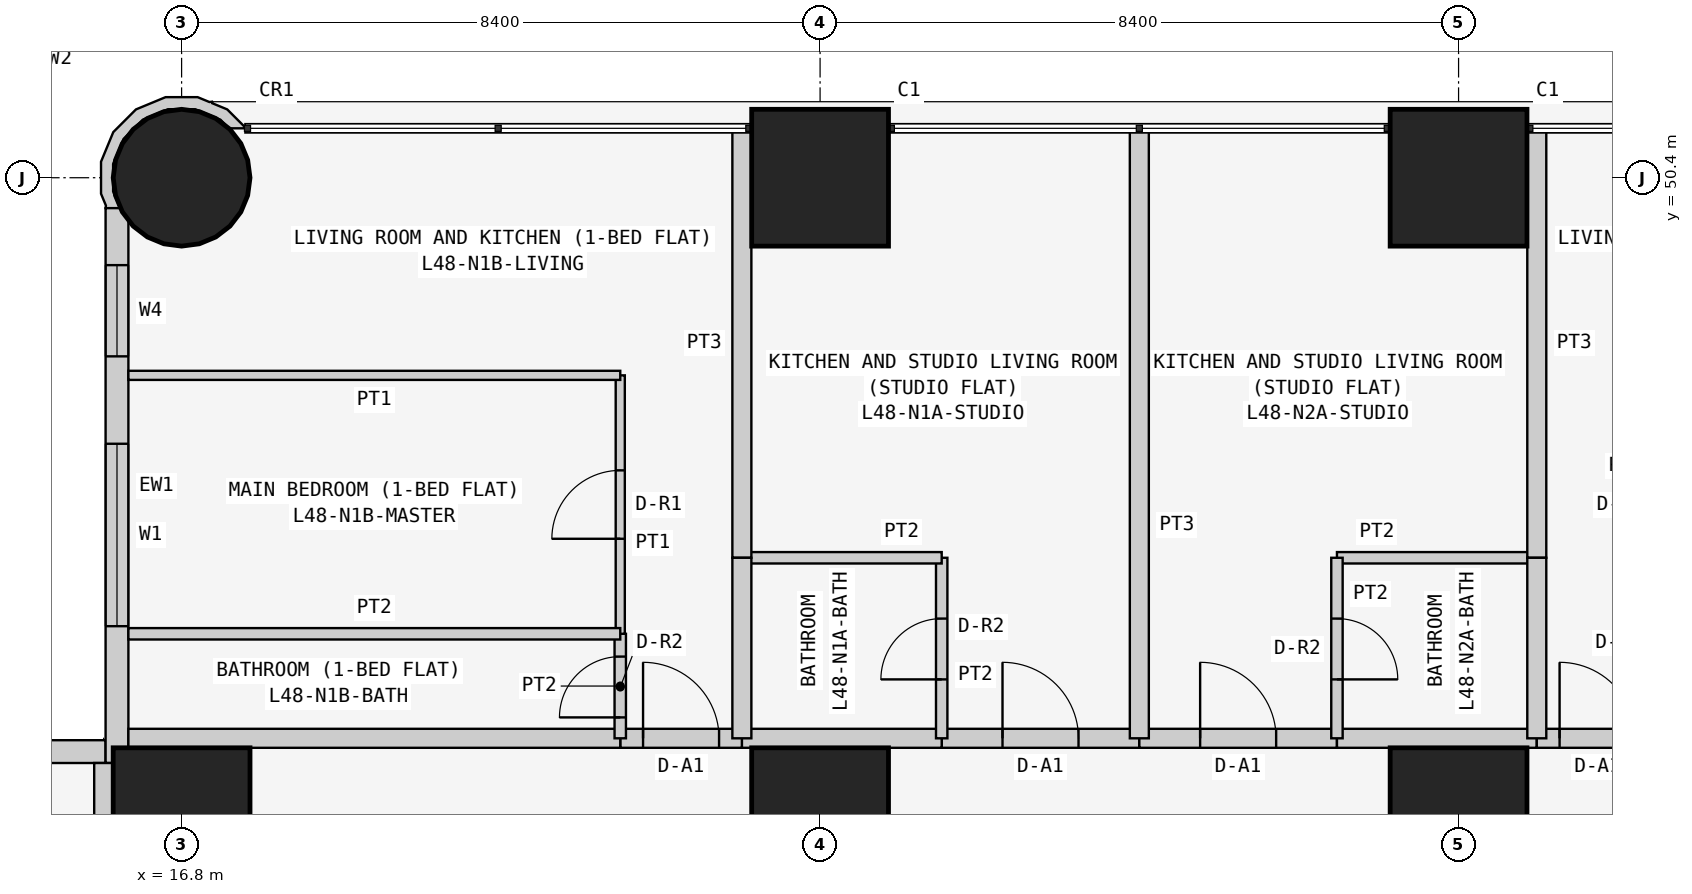
"""IFC4 building model, lengths in metres.
Left out: names, types, materials, properties, quantities, classifications, styles, units other than length and angle.
Written with IfcOpenShell. Run it as: python <this file> out.ifc"""

import sys

from ifc_helpers import new_model, si_unit, direction, frame, frame_2d, origin, origin_2d, place, context, subcontext, project, spatial, polyline, rectangle, circle, outline, extrude, element, fill, save


model = new_model("IFC4")
c1 = context("Model", 3, precision=1e-05, world=origin(), true_north=direction((0.0, 1.0)))
c2 = subcontext(c1, "Body", "Model", "MODEL_VIEW")
j1 = project(units=[si_unit("LENGTHUNIT", "METRE"), si_unit("PLANEANGLEUNIT", "RADIAN")], contexts=[c1])
p1 = place(None, origin())
s1 = spatial("IfcSite", under=j1, at=p1, CompositionType="ELEMENT")
p2 = place(p1, origin())
s2 = spatial("IfcBuilding", under=s1, at=p2, CompositionType="ELEMENT")
p3 = place(p2, frame((0.0, 0.0, 186.9)))
s3 = spatial("IfcBuildingStorey", under=s2, at=p3, CompositionType="ELEMENT", Elevation=186.9)
p4 = place(p3, frame((16.8, 42.0, 0.0), z_axis=(0.0, 0.0, 1.0), x_axis=(1.0, 0.0, 0.0)))
e1 = element("IfcColumn", 1, at=p4, inside=s3, PredefinedType="COLUMN", context=c2, shape_type="SweptSolid", body=[
    extrude(rectangle(XDim=1.8, YDim=1.8, at=origin_2d()), origin(), (0.0, 0.0, 1.0), 3.6),
])
p5 = place(p3, frame((16.8, 50.4, 0.0), z_axis=(0.0, 0.0, 1.0), x_axis=(1.0, 0.0, 0.0)))
e2 = element("IfcColumn", 2, at=p5, inside=s3, PredefinedType="COLUMN", context=c2, shape_type="SweptSolid", body=[
    extrude(circle(Radius=0.9, at=origin_2d()), origin(), (0.0, 0.0, 1.0), 3.6),
])
for number, where, z_axis, x_axis in (
    (3, (25.2, 42.0, 0.0), (0.0, 0.0, 1.0), (1.0, 0.0, 0.0)),
    (4, (25.2, 50.4, 0.0), (0.0, 0.0, 1.0), (1.0, 0.0, 0.0)),
    (5, (33.6, 42.0, 0.0), (0.0, 0.0, 1.0), (1.0, 0.0, 0.0)),
    (6, (33.6, 50.4, 0.0), (0.0, 0.0, 1.0), (1.0, 0.0, 0.0)),
):
    element("IfcColumn", number, at=place(p3, frame(where, z_axis=z_axis, x_axis=x_axis)), inside=s3, PredefinedType="COLUMN", context=c2, shape_type="SweptSolid", body=[
        extrude(rectangle(XDim=1.8, YDim=1.8, at=origin_2d()), origin(), (0.0, 0.0, 1.0), 3.6),
    ])
p6 = place(p3, frame((15.8, 42.85, 0.0), z_axis=(0.0, 0.0, 1.0), x_axis=(-1.0, 0.0, 0.0)))
e7 = element("IfcWall", 7, at=p6, inside=s3, PredefinedType="SOLIDWALL", context=c2, shape_type="SweptSolid", body=[
    extrude(rectangle(XDim=15.4, YDim=0.3, at=frame_2d((7.7, 0.0))), origin(), (0.0, 0.0, 1.0), 3.45),
])
p7 = place(p6, frame((1.2, 0.0, 0.9)))
e8 = element("IfcOpeningElement", 8, at=p7, cuts=e7, PredefinedType="OPENING", context=c2, shape_type="SweptSolid", body=[
    extrude(rectangle(XDim=1.8, YDim=1.5, at=frame_2d((0.9, 0.75))), frame((0.0, 0.16, 0.0), z_axis=(0.0, -1.0, 0.0), x_axis=(1.0, 0.0, 0.0)), (0.0, 0.0, 1.0), 0.32),
])
p8 = place(p6, frame((4.95, 0.0, 1.5)))
e9 = element("IfcOpeningElement", 9, at=p8, cuts=e7, PredefinedType="OPENING", context=c2, shape_type="SweptSolid", body=[
    extrude(rectangle(XDim=0.9, YDim=0.7, at=frame_2d((0.45, 0.35))), frame((0.0, 0.16, 0.0), z_axis=(0.0, -1.0, 0.0), x_axis=(1.0, 0.0, 0.0)), (0.0, 0.0, 1.0), 0.32),
])
p9 = place(p6, frame((8.5, 0.0, 0.9)))
e10 = element("IfcOpeningElement", 10, at=p9, cuts=e7, PredefinedType="OPENING", context=c2, shape_type="SweptSolid", body=[
    extrude(rectangle(XDim=1.8, YDim=1.5, at=frame_2d((0.9, 0.75))), frame((0.0, 0.16, 0.0), z_axis=(0.0, -1.0, 0.0), x_axis=(1.0, 0.0, 0.0)), (0.0, 0.0, 1.0), 0.32),
])
p10 = place(p6, frame((12.5, 0.0, 0.0)))
e11 = element("IfcOpeningElement", 11, at=p10, cuts=e7, PredefinedType="OPENING", context=c2, shape_type="SweptSolid", body=[
    extrude(rectangle(XDim=0.9, YDim=2.4, at=frame_2d((0.45, 1.2))), frame((0.0, 0.16, 0.0), z_axis=(0.0, -1.0, 0.0), x_axis=(1.0, 0.0, 0.0)), (0.0, 0.0, 1.0), 0.32),
])
p11 = place(p6, frame((13.5, 0.0, 0.9)))
e12 = element("IfcOpeningElement", 12, at=p11, cuts=e7, PredefinedType="OPENING", context=c2, shape_type="SweptSolid", body=[
    extrude(rectangle(XDim=1.2, YDim=1.5, at=frame_2d((0.6, 0.75))), frame((0.0, 0.16, 0.0), z_axis=(0.0, -1.0, 0.0), x_axis=(1.0, 0.0, 0.0)), (0.0, 0.0, 1.0), 0.32),
])
p12 = place(p3, frame((15.95, 50.0, 0.0), z_axis=(0.0, 0.0, 1.0), x_axis=(0.0, -1.0, 0.0)))
e13 = element("IfcWall", 13, at=p12, inside=s3, PredefinedType="SOLIDWALL", context=c2, shape_type="SweptSolid", body=[
    extrude(rectangle(XDim=7.3, YDim=0.3, at=frame_2d((3.65, 0.0))), origin(), (0.0, 0.0, 1.0), 3.45),
])
p13 = place(p12, frame((3.1, 0.0, 0.9)))
e14 = element("IfcOpeningElement", 14, at=p13, cuts=e13, PredefinedType="OPENING", context=c2, shape_type="SweptSolid", body=[
    extrude(rectangle(XDim=2.4, YDim=1.5, at=frame_2d((1.2, 0.75))), frame((0.0, 0.16, 0.0), z_axis=(0.0, -1.0, 0.0), x_axis=(1.0, 0.0, 0.0)), (0.0, 0.0, 1.0), 0.32),
])
p14 = place(p12, frame((0.75, 0.0, 0.9)))
e15 = element("IfcOpeningElement", 15, at=p14, cuts=e13, PredefinedType="OPENING", context=c2, shape_type="SweptSolid", body=[
    extrude(rectangle(XDim=1.2, YDim=1.5, at=frame_2d((0.6, 0.75))), frame((0.0, 0.16, 0.0), z_axis=(0.0, -1.0, 0.0), x_axis=(1.0, 0.0, 0.0)), (0.0, 0.0, 1.0), 0.32),
])
p15 = place(p3, frame((17.567, 51.011, 0.0), z_axis=(0.0, 0.0, 1.0), x_axis=(-0.377204953059, 0.926129809145, 0.0)))
e16 = element("IfcWall", 16, at=p15, inside=s3, PredefinedType="SOLIDWALL", context=c2, shape_type="SweptSolid", body=[
    extrude(outline(polyline([(-0.27, 2.017), (-0.37, 1.841), (-0.102, 1.842), (0.23, 1.707), (0.485, 1.455), (0.624, 1.125), (0.626, 0.766), (0.491, 0.434), (0.239, 0.18), (0.09, 0.117), (0.011, -0.078), (0.025, -0.083), (0.329, 0.045), (0.48, 0.197), (0.499, 0.193), (0.507, 0.225), (0.626, 0.345), (0.785, 0.736), (0.782, 1.157), (0.619, 1.546), (0.319, 1.842), (-0.072, 2.001), (-0.24, 2.0), (-0.27, 2.017)])), origin(), (0.0, 0.0, 1.0), 3.45),
])
p16 = place(p3, frame((26.8, 43.025, 0.0), z_axis=(0.0, 0.0, 1.0), x_axis=(1.0, 0.0, 0.0)))
e17 = element("IfcWall", 17, at=p16, inside=s3, PredefinedType="PARTITIONING", context=c2, shape_type="SweptSolid", body=[
    extrude(rectangle(XDim=2.6, YDim=0.25, at=frame_2d((1.3, 0.0))), origin(), (0.0, 0.0, 1.0), 3.45),
])
p17 = place(p16, frame((0.8, 0.0, 0.0)))
e18 = element("IfcOpeningElement", 18, at=p17, cuts=e17, PredefinedType="OPENING", context=c2, shape_type="SweptSolid", body=[
    extrude(rectangle(XDim=1.0, YDim=2.1, at=frame_2d((0.5, 1.05))), frame((0.0, 0.135, 0.0), z_axis=(0.0, -1.0, 0.0), x_axis=(1.0, 0.0, 0.0)), (0.0, 0.0, 1.0), 0.27),
])
p18 = place(p3, frame((24.171, 43.025, 0.0), z_axis=(0.0, 0.0, 1.0), x_axis=(1.0, 0.0, 0.0)))
e19 = element("IfcWall", 19, at=p18, inside=s3, PredefinedType="PARTITIONING", context=c2, shape_type="SweptSolid", body=[
    extrude(rectangle(XDim=2.629, YDim=0.25, at=frame_2d((1.314, 0.0))), origin(), (0.0, 0.0, 1.0), 3.45),
])
p19 = place(p3, frame((22.571, 43.025, 0.0), z_axis=(0.0, 0.0, 1.0), x_axis=(1.0, 0.0, 0.0)))
e20 = element("IfcWall", 20, at=p19, inside=s3, PredefinedType="PARTITIONING", context=c2, shape_type="SweptSolid", body=[
    extrude(rectangle(XDim=1.6, YDim=0.25, at=frame_2d((0.8, 0.0))), origin(), (0.0, 0.0, 1.0), 3.45),
])
p20 = place(p19, frame((0.3, 0.0, 0.0)))
e21 = element("IfcOpeningElement", 21, at=p20, cuts=e20, PredefinedType="OPENING", context=c2, shape_type="SweptSolid", body=[
    extrude(rectangle(XDim=1.0, YDim=2.1, at=frame_2d((0.5, 1.05))), frame((0.0, 0.135, 0.0), z_axis=(0.0, -1.0, 0.0), x_axis=(1.0, 0.0, 0.0)), (0.0, 0.0, 1.0), 0.27),
])
p21 = place(p3, frame((16.1, 43.025, 0.0), z_axis=(0.0, 0.0, 1.0), x_axis=(1.0, 0.0, 0.0)))
e22 = element("IfcWall", 22, at=p21, inside=s3, PredefinedType="PARTITIONING", context=c2, shape_type="SweptSolid", body=[
    extrude(rectangle(XDim=6.471, YDim=0.25, at=frame_2d((3.235, 0.0))), origin(), (0.0, 0.0, 1.0), 3.45),
])
p22 = place(p3, frame((29.4, 43.025, 0.0), z_axis=(0.0, 0.0, 1.0), x_axis=(1.0, 0.0, 0.0)))
e23 = element("IfcWall", 23, at=p22, inside=s3, PredefinedType="PARTITIONING", context=c2, shape_type="SweptSolid", body=[
    extrude(rectangle(XDim=2.6, YDim=0.25, at=frame_2d((1.3, 0.0))), origin(), (0.0, 0.0, 1.0), 3.45),
])
p23 = place(p22, frame((0.8, 0.0, 0.0)))
e24 = element("IfcOpeningElement", 24, at=p23, cuts=e23, PredefinedType="OPENING", context=c2, shape_type="SweptSolid", body=[
    extrude(rectangle(XDim=1.0, YDim=2.1, at=frame_2d((0.5, 1.05))), frame((0.0, 0.135, 0.0), z_axis=(0.0, -1.0, 0.0), x_axis=(1.0, 0.0, 0.0)), (0.0, 0.0, 1.0), 0.27),
])
p24 = place(p3, frame((32.0, 43.025, 0.0), z_axis=(0.0, 0.0, 1.0), x_axis=(1.0, 0.0, 0.0)))
e25 = element("IfcWall", 25, at=p24, inside=s3, PredefinedType="PARTITIONING", context=c2, shape_type="SweptSolid", body=[
    extrude(rectangle(XDim=2.629, YDim=0.25, at=frame_2d((1.314, 0.0))), origin(), (0.0, 0.0, 1.0), 3.45),
])
p25 = place(p3, frame((34.629, 43.025, 0.0), z_axis=(0.0, 0.0, 1.0), x_axis=(1.0, 0.0, 0.0)))
e26 = element("IfcWall", 26, at=p25, inside=s3, PredefinedType="PARTITIONING", context=c2, shape_type="SweptSolid", body=[
    extrude(rectangle(XDim=1.6, YDim=0.25, at=frame_2d((0.8, 0.0))), origin(), (0.0, 0.0, 1.0), 3.45),
])
p26 = place(p25, frame((0.3, 0.0, 0.0)))
e27 = element("IfcOpeningElement", 27, at=p26, cuts=e26, PredefinedType="OPENING", context=c2, shape_type="SweptSolid", body=[
    extrude(rectangle(XDim=1.0, YDim=2.1, at=frame_2d((0.5, 1.05))), frame((0.0, 0.135, 0.0), z_axis=(0.0, -1.0, 0.0), x_axis=(1.0, 0.0, 0.0)), (0.0, 0.0, 1.0), 0.27),
])
p27 = place(p3, frame((15.775, 35.829, 0.0), z_axis=(0.0, 0.0, 1.0), x_axis=(0.0, 1.0, 0.0)))
e28 = element("IfcWall", 28, at=p27, inside=s3, PredefinedType="PARTITIONING", context=c2, shape_type="SweptSolid", body=[
    extrude(rectangle(XDim=6.871, YDim=0.25, at=frame_2d((3.436, 0.0))), origin(), (0.0, 0.0, 1.0), 3.45),
])
p28 = place(p3, frame((26.8, 43.025, 0.0), z_axis=(0.0, 0.0, 1.0), x_axis=(0.0, 1.0, 0.0)))
e29 = element("IfcWall", 29, at=p28, inside=s3, PredefinedType="PARTITIONING", context=c2, shape_type="SweptSolid", body=[
    extrude(rectangle(XDim=2.375, YDim=0.15, at=frame_2d((1.188, 0.0))), origin(), (0.0, 0.0, 1.0), 3.45),
])
p29 = place(p28, frame((0.775, 0.0, 0.0)))
e30 = element("IfcOpeningElement", 30, at=p29, cuts=e29, PredefinedType="OPENING", context=c2, shape_type="SweptSolid", body=[
    extrude(rectangle(XDim=0.8, YDim=2.1, at=frame_2d((0.4, 1.05))), frame((0.0, 0.085, 0.0), z_axis=(0.0, -1.0, 0.0), x_axis=(1.0, 0.0, 0.0)), (0.0, 0.0, 1.0), 0.17),
])
p30 = place(p3, frame((26.8, 45.4, 0.0), z_axis=(0.0, 0.0, 1.0), x_axis=(-1.0, 0.0, 0.0)))
e31 = element("IfcWall", 31, at=p30, inside=s3, PredefinedType="PARTITIONING", context=c2, shape_type="SweptSolid", body=[
    extrude(rectangle(XDim=2.629, YDim=0.15, at=frame_2d((1.314, 0.0))), origin(), (0.0, 0.0, 1.0), 3.45),
])
p31 = place(p3, frame((24.171, 45.4, 0.0), z_axis=(0.0, 0.0, 1.0), x_axis=(0.0, 1.0, 0.0)))
e32 = element("IfcWall", 32, at=p31, inside=s3, PredefinedType="PARTITIONING", context=c2, shape_type="SweptSolid", body=[
    extrude(rectangle(XDim=5.65, YDim=0.25, at=frame_2d((2.825, 0.0))), origin(), (0.0, 0.0, 1.0), 3.45),
])
p32 = place(p3, frame((29.4, 51.05, 0.0), z_axis=(0.0, 0.0, 1.0), x_axis=(0.0, -1.0, 0.0)))
e33 = element("IfcWall", 33, at=p32, inside=s3, PredefinedType="PARTITIONING", context=c2, shape_type="SweptSolid", body=[
    extrude(rectangle(XDim=8.025, YDim=0.25, at=frame_2d((4.013, 0.0))), origin(), (0.0, 0.0, 1.0), 2.848),
])
p33 = place(p3, frame((24.171, 45.4, 0.0), z_axis=(0.0, 0.0, 1.0), x_axis=(0.0, -1.0, 0.0)))
e34 = element("IfcWall", 34, at=p33, inside=s3, PredefinedType="PARTITIONING", context=c2, shape_type="SweptSolid", body=[
    extrude(rectangle(XDim=2.375, YDim=0.25, at=frame_2d((1.188, 0.0))), origin(), (0.0, 0.0, 1.0), 3.45),
])
p34 = place(p3, frame((22.571, 43.025, 0.0), z_axis=(0.0, 0.0, 1.0), x_axis=(0.0, 1.0, 0.0)))
e35 = element("IfcWall", 35, at=p34, inside=s3, PredefinedType="PARTITIONING", context=c2, shape_type="SweptSolid", body=[
    extrude(rectangle(XDim=1.375, YDim=0.15, at=frame_2d((0.688, 0.0))), origin(), (0.0, 0.0, 1.0), 3.45),
])
p35 = place(p34, frame((0.275, 0.0, 0.0)))
e36 = element("IfcOpeningElement", 36, at=p35, cuts=e35, PredefinedType="OPENING", context=c2, shape_type="SweptSolid", body=[
    extrude(rectangle(XDim=0.8, YDim=2.1, at=frame_2d((0.4, 1.05))), frame((0.0, 0.085, 0.0), z_axis=(0.0, -1.0, 0.0), x_axis=(1.0, 0.0, 0.0)), (0.0, 0.0, 1.0), 0.17),
])
p36 = place(p3, frame((22.571, 44.4, 0.0), z_axis=(0.0, 0.0, 1.0), x_axis=(0.0, 1.0, 0.0)))
e37 = element("IfcWall", 37, at=p36, inside=s3, PredefinedType="PARTITIONING", context=c2, shape_type="SweptSolid", body=[
    extrude(rectangle(XDim=3.4, YDim=0.12, at=frame_2d((1.7, 0.0))), origin(), (0.0, 0.0, 1.0), 3.45),
])
p37 = place(p36, frame((1.25, 0.0, 0.0)))
e38 = element("IfcOpeningElement", 38, at=p37, cuts=e37, PredefinedType="OPENING", context=c2, shape_type="SweptSolid", body=[
    extrude(rectangle(XDim=0.9, YDim=2.1, at=frame_2d((0.45, 1.05))), frame((0.0, 0.07, 0.0), z_axis=(0.0, -1.0, 0.0), x_axis=(1.0, 0.0, 0.0)), (0.0, 0.0, 1.0), 0.14),
])
p38 = place(p3, frame((22.571, 47.8, 0.0), z_axis=(0.0, 0.0, 1.0), x_axis=(-1.0, 0.0, 0.0)))
e39 = element("IfcWall", 39, at=p38, inside=s3, PredefinedType="PARTITIONING", context=c2, shape_type="SweptSolid", body=[
    extrude(rectangle(XDim=6.471, YDim=0.12, at=frame_2d((3.235, 0.0))), origin(), (0.0, 0.0, 1.0), 3.45),
])
p39 = place(p3, frame((22.571, 44.4, 0.0), z_axis=(0.0, 0.0, 1.0), x_axis=(-1.0, 0.0, 0.0)))
e40 = element("IfcWall", 40, at=p39, inside=s3, PredefinedType="PARTITIONING", context=c2, shape_type="SweptSolid", body=[
    extrude(rectangle(XDim=6.471, YDim=0.15, at=frame_2d((3.235, 0.0))), origin(), (0.0, 0.0, 1.0), 3.45),
])
p40 = place(p3, frame((34.629, 45.4, 0.0), z_axis=(0.0, 0.0, 1.0), x_axis=(-1.0, 0.0, 0.0)))
e41 = element("IfcWall", 41, at=p40, inside=s3, PredefinedType="PARTITIONING", context=c2, shape_type="SweptSolid", body=[
    extrude(rectangle(XDim=2.629, YDim=0.15, at=frame_2d((1.314, 0.0))), origin(), (0.0, 0.0, 1.0), 3.45),
])
p41 = place(p3, frame((32.0, 45.4, 0.0), z_axis=(0.0, 0.0, 1.0), x_axis=(0.0, -1.0, 0.0)))
e42 = element("IfcWall", 42, at=p41, inside=s3, PredefinedType="PARTITIONING", context=c2, shape_type="SweptSolid", body=[
    extrude(rectangle(XDim=2.375, YDim=0.15, at=frame_2d((1.188, 0.0))), origin(), (0.0, 0.0, 1.0), 3.45),
])
p42 = place(p41, frame((0.8, 0.0, 0.0)))
e43 = element("IfcOpeningElement", 43, at=p42, cuts=e42, PredefinedType="OPENING", context=c2, shape_type="SweptSolid", body=[
    extrude(rectangle(XDim=0.8, YDim=2.1, at=frame_2d((0.4, 1.05))), frame((0.0, 0.085, 0.0), z_axis=(0.0, -1.0, 0.0), x_axis=(1.0, 0.0, 0.0)), (0.0, 0.0, 1.0), 0.17),
])
p43 = place(p3, frame((34.629, 51.05, 0.0), z_axis=(0.0, 0.0, 1.0), x_axis=(0.0, -1.0, 0.0)))
e44 = element("IfcWall", 44, at=p43, inside=s3, PredefinedType="PARTITIONING", context=c2, shape_type="SweptSolid", body=[
    extrude(rectangle(XDim=5.65, YDim=0.25, at=frame_2d((2.825, 0.0))), origin(), (0.0, 0.0, 1.0), 3.45),
])
p44 = place(p3, frame((34.629, 45.4, 0.0), z_axis=(0.0, 0.0, 1.0), x_axis=(0.0, -1.0, 0.0)))
e45 = element("IfcWall", 45, at=p44, inside=s3, PredefinedType="PARTITIONING", context=c2, shape_type="SweptSolid", body=[
    extrude(rectangle(XDim=2.375, YDim=0.25, at=frame_2d((1.188, 0.0))), origin(), (0.0, 0.0, 1.0), 3.45),
])
p45 = place(p13, origin())
e46 = element("IfcWindow", 46, at=p45, inside=s3, PartitioningType="SINGLE_PANEL", PredefinedType="WINDOW", context=c2, shape_type="SweptSolid", body=[
    extrude(rectangle(XDim=2.4, YDim=1.5, at=frame_2d((1.2, 0.75))), frame((0.0, 0.03, 0.0), z_axis=(0.0, -1.0, 0.0), x_axis=(1.0, 0.0, 0.0)), (0.0, 0.0, 1.0), 0.06),
])
fill(e14, e46)
p46 = place(p14, origin())
e47 = element("IfcWindow", 47, at=p46, inside=s3, PartitioningType="SINGLE_PANEL", PredefinedType="WINDOW", context=c2, shape_type="SweptSolid", body=[
    extrude(rectangle(XDim=1.2, YDim=1.5, at=frame_2d((0.6, 0.75))), frame((0.0, 0.03, 0.0), z_axis=(0.0, -1.0, 0.0), x_axis=(1.0, 0.0, 0.0)), (0.0, 0.0, 1.0), 0.06),
])
fill(e15, e47)
p47 = place(p17, origin())
e48 = element("IfcDoor", 48, at=p47, inside=s3, OperationType="SINGLE_SWING_LEFT", PredefinedType="DOOR", context=c2, shape_type="SweptSolid", body=[
    extrude(rectangle(XDim=1.0, YDim=2.1, at=frame_2d((0.5, 1.05))), frame((0.0, 0.025, 0.0), z_axis=(0.0, -1.0, 0.0), x_axis=(1.0, 0.0, 0.0)), (0.0, 0.0, 1.0), 0.05),
])
fill(e18, e48)
p48 = place(p29, origin())
e49 = element("IfcDoor", 49, at=p48, inside=s3, OperationType="SINGLE_SWING_LEFT", PredefinedType="DOOR", context=c2, shape_type="SweptSolid", body=[
    extrude(rectangle(XDim=0.8, YDim=2.1, at=frame_2d((0.4, 1.05))), frame((0.0, 0.025, 0.0), z_axis=(0.0, -1.0, 0.0), x_axis=(1.0, 0.0, 0.0)), (0.0, 0.0, 1.0), 0.05),
])
fill(e30, e49)
p49 = place(p20, origin())
e50 = element("IfcDoor", 50, at=p49, inside=s3, OperationType="SINGLE_SWING_LEFT", PredefinedType="DOOR", context=c2, shape_type="SweptSolid", body=[
    extrude(rectangle(XDim=1.0, YDim=2.1, at=frame_2d((0.5, 1.05))), frame((0.0, 0.025, 0.0), z_axis=(0.0, -1.0, 0.0), x_axis=(1.0, 0.0, 0.0)), (0.0, 0.0, 1.0), 0.05),
])
fill(e21, e50)
p50 = place(p35, origin())
e51 = element("IfcDoor", 51, at=p50, inside=s3, OperationType="SINGLE_SWING_LEFT", PredefinedType="DOOR", context=c2, shape_type="SweptSolid", body=[
    extrude(rectangle(XDim=0.8, YDim=2.1, at=frame_2d((0.4, 1.05))), frame((0.0, 0.025, 0.0), z_axis=(0.0, -1.0, 0.0), x_axis=(1.0, 0.0, 0.0)), (0.0, 0.0, 1.0), 0.05),
])
fill(e36, e51)
p51 = place(p37, origin())
e52 = element("IfcDoor", 52, at=p51, inside=s3, OperationType="SINGLE_SWING_LEFT", PredefinedType="DOOR", context=c2, shape_type="SweptSolid", body=[
    extrude(rectangle(XDim=0.9, YDim=2.1, at=frame_2d((0.45, 1.05))), frame((0.0, 0.025, 0.0), z_axis=(0.0, -1.0, 0.0), x_axis=(1.0, 0.0, 0.0)), (0.0, 0.0, 1.0), 0.05),
])
fill(e38, e52)
p52 = place(p23, origin())
e53 = element("IfcDoor", 53, at=p52, inside=s3, OperationType="SINGLE_SWING_LEFT", PredefinedType="DOOR", context=c2, shape_type="SweptSolid", body=[
    extrude(rectangle(XDim=1.0, YDim=2.1, at=frame_2d((0.5, 1.05))), frame((0.0, 0.025, 0.0), z_axis=(0.0, -1.0, 0.0), x_axis=(1.0, 0.0, 0.0)), (0.0, 0.0, 1.0), 0.05),
])
fill(e24, e53)
p53 = place(p42, origin())
e54 = element("IfcDoor", 54, at=p53, inside=s3, OperationType="SINGLE_SWING_RIGHT", PredefinedType="DOOR", context=c2, shape_type="SweptSolid", body=[
    extrude(rectangle(XDim=0.8, YDim=2.1, at=frame_2d((0.4, 1.05))), frame((0.0, 0.025, 0.0), z_axis=(0.0, -1.0, 0.0), x_axis=(1.0, 0.0, 0.0)), (0.0, 0.0, 1.0), 0.05),
])
fill(e43, e54)
p54 = place(p26, origin())
e55 = element("IfcDoor", 55, at=p54, inside=s3, OperationType="SINGLE_SWING_LEFT", PredefinedType="DOOR", context=c2, shape_type="SweptSolid", body=[
    extrude(rectangle(XDim=1.0, YDim=2.1, at=frame_2d((0.5, 1.05))), frame((0.0, 0.025, 0.0), z_axis=(0.0, -1.0, 0.0), x_axis=(1.0, 0.0, 0.0)), (0.0, 0.0, 1.0), 0.05),
])
fill(e27, e55)
save(model, sys.argv[1])
